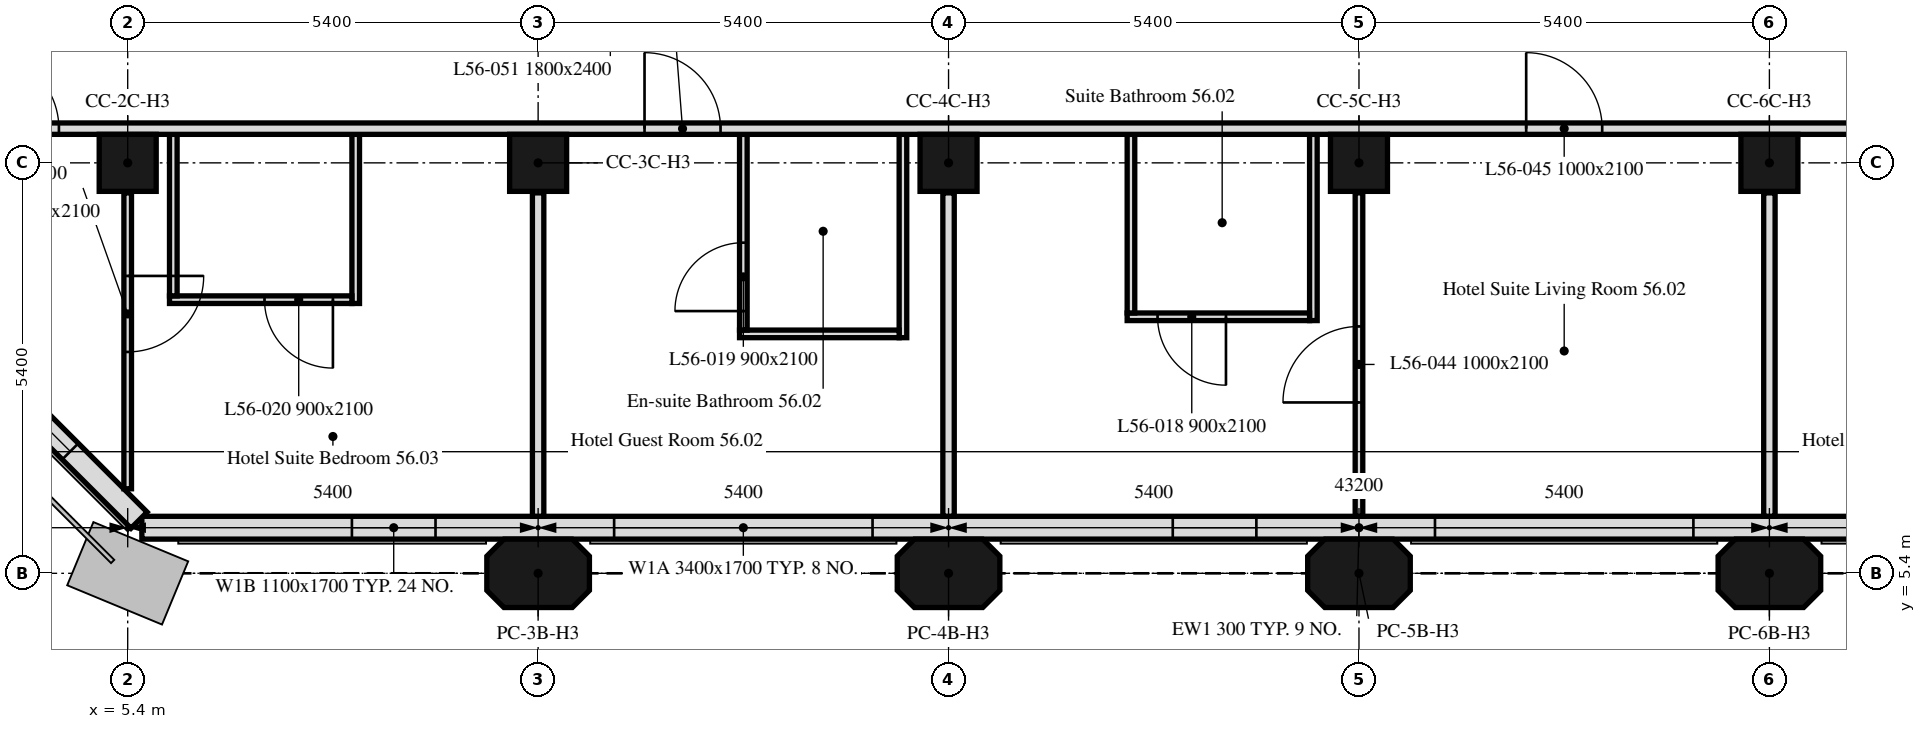
"""IFC4 building model, lengths in metres.
Left out: names, types, materials, properties, quantities, classifications, styles, units other than length and angle.
Written with IfcOpenShell. Run it as: python <this file> out.ifc"""

import sys

from ifc_helpers import new_model, si_unit, direction, frame, frame_2d, origin, origin_2d, place, context, subcontext, project, spatial, polyline, rectangle, outline, extrude, element, fill, save


model = new_model("IFC4")
c1 = context("Model", 3, precision=1e-05, world=origin(), true_north=direction((0.0, 1.0)))
c2 = subcontext(c1, "Body", "Model", "MODEL_VIEW")
j1 = project(units=[si_unit("LENGTHUNIT", "METRE"), si_unit("PLANEANGLEUNIT", "RADIAN")], contexts=[c1])
p1 = place(None, origin())
s1 = spatial("IfcSite", under=j1, at=p1, CompositionType="ELEMENT")
p2 = place(p1, origin())
s2 = spatial("IfcBuilding", under=s1, at=p2, CompositionType="ELEMENT")
p3 = place(p2, frame((0.0, 0.0, 223.6)))
s3 = spatial("IfcBuildingStorey", under=s2, at=p3, CompositionType="ELEMENT", Elevation=223.6)
for number, where, z_axis, x_axis in (
    (1, (10.8, 5.4, 0.0), (0.0, 0.0, 1.0), (1.0, 0.0, 0.0)),
    (2, (16.2, 5.4, 0.0), (0.0, 0.0, 1.0), (1.0, 0.0, 0.0)),
    (3, (21.6, 5.4, 0.0), (0.0, 0.0, 1.0), (1.0, 0.0, 0.0)),
    (4, (27.0, 5.4, 0.0), (0.0, 0.0, 1.0), (1.0, 0.0, 0.0)),
):
    element("IfcColumn", number, at=place(p3, frame(where, z_axis=z_axis, x_axis=x_axis)), inside=s3, PredefinedType="COLUMN", context=c2, shape_type="SweptSolid", body=[
        extrude(outline(polyline([(-0.45, -0.45), (0.45, -0.45), (0.675, -0.225), (0.675, 0.225), (0.45, 0.45), (-0.45, 0.45), (-0.675, 0.225), (-0.675, -0.225), (-0.45, -0.45)])), origin(), (0.0, 0.0, 1.0), 3.0),
    ])
for number, where, z_axis, x_axis in (
    (5, (5.4, 10.8, 0.0), (0.0, 0.0, 1.0), (1.0, 0.0, 0.0)),
    (6, (10.8, 10.8, 0.0), (0.0, 0.0, 1.0), (1.0, 0.0, 0.0)),
    (7, (16.2, 10.8, 0.0), (0.0, 0.0, 1.0), (1.0, 0.0, 0.0)),
    (8, (21.6, 10.8, 0.0), (0.0, 0.0, 1.0), (1.0, 0.0, 0.0)),
    (9, (27.0, 10.8, 0.0), (0.0, 0.0, 1.0), (1.0, 0.0, 0.0)),
):
    element("IfcColumn", number, at=place(p3, frame(where, z_axis=z_axis, x_axis=x_axis)), inside=s3, PredefinedType="COLUMN", context=c2, shape_type="SweptSolid", body=[
        extrude(rectangle(XDim=0.75, YDim=0.75, at=origin_2d()), origin(), (0.0, 0.0, 1.0), 3.0),
    ])
p4 = place(p3, frame((5.586, 6.0, 0.0), z_axis=(0.0, 0.0, 1.0), x_axis=(1.0, 0.0, 0.0)))
e10 = element("IfcWall", 10, at=p4, inside=s3, PredefinedType="SOLIDWALL", context=c2, shape_type="SweptSolid", body=[
    extrude(rectangle(XDim=32.027, YDim=0.3, at=frame_2d((16.014, 0.0))), origin(), (0.0, 0.0, 1.0), 3.0),
])
p5 = place(p4, frame((2.764, 0.0, 0.9)))
e11 = element("IfcOpeningElement", 11, at=p5, cuts=e10, PredefinedType="OPENING", context=c2, shape_type="SweptSolid", body=[
    extrude(rectangle(XDim=1.1, YDim=1.7, at=frame_2d((0.55, 0.85))), frame((0.0, 0.16, 0.0), z_axis=(0.0, -1.0, 0.0), x_axis=(1.0, 0.0, 0.0)), (0.0, 0.0, 1.0), 0.32),
])
p6 = place(p4, frame((6.214, 0.0, 0.9)))
e12 = element("IfcOpeningElement", 12, at=p6, cuts=e10, PredefinedType="OPENING", context=c2, shape_type="SweptSolid", body=[
    extrude(rectangle(XDim=3.4, YDim=1.7, at=frame_2d((1.7, 0.85))), frame((0.0, 0.16, 0.0), z_axis=(0.0, -1.0, 0.0), x_axis=(1.0, 0.0, 0.0)), (0.0, 0.0, 1.0), 0.32),
])
p7 = place(p4, frame((13.564, 0.0, 0.9)))
e13 = element("IfcOpeningElement", 13, at=p7, cuts=e10, PredefinedType="OPENING", context=c2, shape_type="SweptSolid", body=[
    extrude(rectangle(XDim=1.1, YDim=1.7, at=frame_2d((0.55, 0.85))), frame((0.0, 0.16, 0.0), z_axis=(0.0, -1.0, 0.0), x_axis=(1.0, 0.0, 0.0)), (0.0, 0.0, 1.0), 0.32),
])
p8 = place(p4, frame((17.014, 0.0, 0.9)))
e14 = element("IfcOpeningElement", 14, at=p8, cuts=e10, PredefinedType="OPENING", context=c2, shape_type="SweptSolid", body=[
    extrude(rectangle(XDim=3.4, YDim=1.7, at=frame_2d((1.7, 0.85))), frame((0.0, 0.16, 0.0), z_axis=(0.0, -1.0, 0.0), x_axis=(1.0, 0.0, 0.0)), (0.0, 0.0, 1.0), 0.32),
])
p9 = place(p4, frame((24.364, 0.0, 0.9)))
e15 = element("IfcOpeningElement", 15, at=p9, cuts=e10, PredefinedType="OPENING", context=c2, shape_type="SweptSolid", body=[
    extrude(rectangle(XDim=1.1, YDim=1.7, at=frame_2d((0.55, 0.85))), frame((0.0, 0.16, 0.0), z_axis=(0.0, -1.0, 0.0), x_axis=(1.0, 0.0, 0.0)), (0.0, 0.0, 1.0), 0.32),
])
p10 = place(p4, frame((27.814, 0.0, 0.9)))
e16 = element("IfcOpeningElement", 16, at=p10, cuts=e10, PredefinedType="OPENING", context=c2, shape_type="SweptSolid", body=[
    extrude(rectangle(XDim=3.4, YDim=1.7, at=frame_2d((1.7, 0.85))), frame((0.0, 0.16, 0.0), z_axis=(0.0, -1.0, 0.0), x_axis=(1.0, 0.0, 0.0)), (0.0, 0.0, 1.0), 0.32),
])
p11 = place(p3, frame((0.699, 10.949, 0.0), z_axis=(0.0, 0.0, 1.0), x_axis=(0.707106781187, -0.707106781187, 0.0)))
e17 = element("IfcWall", 17, at=p11, inside=s3, PredefinedType="SOLIDWALL", context=c2, shape_type="SweptSolid", body=[
    extrude(rectangle(XDim=6.86, YDim=0.3, at=frame_2d((3.43, 0.0))), origin(), (0.0, 0.0, 1.0), 3.0),
])
p12 = place(p11, frame((1.28, 0.0, 0.9)))
e18 = element("IfcOpeningElement", 18, at=p12, cuts=e17, PredefinedType="OPENING", context=c2, shape_type="SweptSolid", body=[
    extrude(rectangle(XDim=1.1, YDim=1.7, at=frame_2d((0.55, 0.85))), frame((0.0, 0.16, 0.0), z_axis=(0.0, -1.0, 0.0), x_axis=(1.0, 0.0, 0.0)), (0.0, 0.0, 1.0), 0.32),
])
p13 = place(p11, frame((4.48, 0.0, 0.9)))
e19 = element("IfcOpeningElement", 19, at=p13, cuts=e17, PredefinedType="OPENING", context=c2, shape_type="SweptSolid", body=[
    extrude(rectangle(XDim=1.1, YDim=1.7, at=frame_2d((0.55, 0.85))), frame((0.0, 0.16, 0.0), z_axis=(0.0, -1.0, 0.0), x_axis=(1.0, 0.0, 0.0)), (0.0, 0.0, 1.0), 0.32),
])
p14 = place(p3, frame((27.0, 10.405, 0.0), z_axis=(0.0, 0.0, 1.0), x_axis=(0.0, -1.0, 0.0)))
e20 = element("IfcWall", 20, at=p14, inside=s3, PredefinedType="PARTITIONING", context=c2, shape_type="SweptSolid", body=[
    extrude(rectangle(XDim=4.254, YDim=0.15, at=frame_2d((2.127, 0.0))), origin(), (0.0, 0.0, 1.0), 3.0),
])
p15 = place(p3, frame((21.6, 6.151, 0.0), z_axis=(0.0, 0.0, 1.0), x_axis=(0.0, 1.0, 0.0)))
e21 = element("IfcWall", 21, at=p15, inside=s3, PredefinedType="PARTITIONING", context=c2, shape_type="SweptSolid", body=[
    extrude(rectangle(XDim=4.254, YDim=0.1, at=frame_2d((2.127, 0.0))), origin(), (0.0, 0.0, 1.0), 3.0),
])
p16 = place(p15, frame((1.497, 0.0, 0.0)))
e22 = element("IfcOpeningElement", 22, at=p16, cuts=e21, PredefinedType="OPENING", context=c2, shape_type="SweptSolid", body=[
    extrude(rectangle(XDim=1.0, YDim=2.1, at=frame_2d((0.5, 1.05))), frame((0.0, 0.05, 0.0), z_axis=(0.0, -1.0, 0.0), x_axis=(1.0, 0.0, 0.0)), (0.0, 0.0, 1.0), 0.1),
])
p17 = place(p3, frame((21.0, 11.175, 0.0), z_axis=(0.0, 0.0, 1.0), x_axis=(0.0, -1.0, 0.0)))
e23 = element("IfcWall", 23, at=p17, inside=s3, PredefinedType="PARTITIONING", context=c2, shape_type="SweptSolid", body=[
    extrude(rectangle(XDim=2.45, YDim=0.1, at=frame_2d((1.225, 0.0))), origin(), (0.0, 0.0, 1.0), 3.0),
])
p18 = place(p3, frame((20.95, 8.775, 0.0), z_axis=(0.0, 0.0, 1.0), x_axis=(-1.0, 0.0, 0.0)))
e24 = element("IfcWall", 24, at=p18, inside=s3, PredefinedType="PARTITIONING", context=c2, shape_type="SweptSolid", body=[
    extrude(rectangle(XDim=2.4, YDim=0.1, at=frame_2d((1.2, 0.0))), origin(), (0.0, 0.0, 1.0), 3.0),
])
p19 = place(p18, frame((1.1, 0.0, 0.0)))
e25 = element("IfcOpeningElement", 25, at=p19, cuts=e24, PredefinedType="OPENING", context=c2, shape_type="SweptSolid", body=[
    extrude(rectangle(XDim=0.9, YDim=2.1, at=frame_2d((0.45, 1.05))), frame((0.0, 0.05, 0.0), z_axis=(0.0, -1.0, 0.0), x_axis=(1.0, 0.0, 0.0)), (0.0, 0.0, 1.0), 0.1),
])
p20 = place(p3, frame((18.6, 8.825, 0.0), z_axis=(0.0, 0.0, 1.0), x_axis=(0.0, 1.0, 0.0)))
e26 = element("IfcWall", 26, at=p20, inside=s3, PredefinedType="PARTITIONING", context=c2, shape_type="SweptSolid", body=[
    extrude(rectangle(XDim=2.35, YDim=0.1, at=frame_2d((1.175, 0.0))), origin(), (0.0, 0.0, 1.0), 3.0),
])
p21 = place(p3, frame((16.2, 10.405, 0.0), z_axis=(0.0, 0.0, 1.0), x_axis=(0.0, -1.0, 0.0)))
e27 = element("IfcWall", 27, at=p21, inside=s3, PredefinedType="PARTITIONING", context=c2, shape_type="SweptSolid", body=[
    extrude(rectangle(XDim=4.254, YDim=0.15, at=frame_2d((2.127, 0.0))), origin(), (0.0, 0.0, 1.0), 3.0),
])
p22 = place(p3, frame((15.6, 11.175, 0.0), z_axis=(0.0, 0.0, 1.0), x_axis=(0.0, -1.0, 0.0)))
e28 = element("IfcWall", 28, at=p22, inside=s3, PredefinedType="PARTITIONING", context=c2, shape_type="SweptSolid", body=[
    extrude(rectangle(XDim=2.675, YDim=0.1, at=frame_2d((1.337, 0.0))), origin(), (0.0, 0.0, 1.0), 3.0),
])
p23 = place(p3, frame((15.55, 8.55, 0.0), z_axis=(0.0, 0.0, 1.0), x_axis=(-1.0, 0.0, 0.0)))
e29 = element("IfcWall", 29, at=p23, inside=s3, PredefinedType="PARTITIONING", context=c2, shape_type="SweptSolid", body=[
    extrude(rectangle(XDim=2.1, YDim=0.1, at=frame_2d((1.05, 0.0))), origin(), (0.0, 0.0, 1.0), 3.0),
])
p24 = place(p3, frame((13.5, 8.6, 0.0), z_axis=(0.0, 0.0, 1.0), x_axis=(0.0, 1.0, 0.0)))
e30 = element("IfcWall", 30, at=p24, inside=s3, PredefinedType="PARTITIONING", context=c2, shape_type="SweptSolid", body=[
    extrude(rectangle(XDim=2.575, YDim=0.1, at=frame_2d((1.288, 0.0))), origin(), (0.0, 0.0, 1.0), 3.0),
])
p25 = place(p24, frame((0.25, 0.0, 0.0)))
e31 = element("IfcOpeningElement", 31, at=p25, cuts=e30, PredefinedType="OPENING", context=c2, shape_type="SweptSolid", body=[
    extrude(rectangle(XDim=0.9, YDim=2.1, at=frame_2d((0.45, 1.05))), frame((0.0, 0.05, 0.0), z_axis=(0.0, -1.0, 0.0), x_axis=(1.0, 0.0, 0.0)), (0.0, 0.0, 1.0), 0.1),
])
p26 = place(p3, frame((10.8, 10.405, 0.0), z_axis=(0.0, 0.0, 1.0), x_axis=(0.0, -1.0, 0.0)))
e32 = element("IfcWall", 32, at=p26, inside=s3, PredefinedType="PARTITIONING", context=c2, shape_type="SweptSolid", body=[
    extrude(rectangle(XDim=4.254, YDim=0.15, at=frame_2d((2.127, 0.0))), origin(), (0.0, 0.0, 1.0), 3.0),
])
p27 = place(p3, frame((8.4, 11.175, 0.0), z_axis=(0.0, 0.0, 1.0), x_axis=(0.0, -1.0, 0.0)))
e33 = element("IfcWall", 33, at=p27, inside=s3, PredefinedType="PARTITIONING", context=c2, shape_type="SweptSolid", body=[
    extrude(rectangle(XDim=2.225, YDim=0.1, at=frame_2d((1.113, 0.0))), origin(), (0.0, 0.0, 1.0), 3.0),
])
p28 = place(p3, frame((8.35, 9.0, 0.0), z_axis=(0.0, 0.0, 1.0), x_axis=(-1.0, 0.0, 0.0)))
e34 = element("IfcWall", 34, at=p28, inside=s3, PredefinedType="PARTITIONING", context=c2, shape_type="SweptSolid", body=[
    extrude(rectangle(XDim=2.4, YDim=0.1, at=frame_2d((1.2, 0.0))), origin(), (0.0, 0.0, 1.0), 3.0),
])
p29 = place(p28, frame((0.25, 0.0, 0.0)))
e35 = element("IfcOpeningElement", 35, at=p29, cuts=e34, PredefinedType="OPENING", context=c2, shape_type="SweptSolid", body=[
    extrude(rectangle(XDim=0.9, YDim=2.1, at=frame_2d((0.45, 1.05))), frame((0.0, 0.05, 0.0), z_axis=(0.0, -1.0, 0.0), x_axis=(1.0, 0.0, 0.0)), (0.0, 0.0, 1.0), 0.1),
])
p30 = place(p3, frame((6.0, 9.05, 0.0), z_axis=(0.0, 0.0, 1.0), x_axis=(0.0, 1.0, 0.0)))
e36 = element("IfcWall", 36, at=p30, inside=s3, PredefinedType="PARTITIONING", context=c2, shape_type="SweptSolid", body=[
    extrude(rectangle(XDim=2.125, YDim=0.1, at=frame_2d((1.062, 0.0))), origin(), (0.0, 0.0, 1.0), 3.0),
])
p31 = place(p3, frame((5.4, 10.405, 0.0), z_axis=(0.0, 0.0, 1.0), x_axis=(0.0, -1.0, 0.0)))
e37 = element("IfcWall", 37, at=p31, inside=s3, PredefinedType="PARTITIONING", context=c2, shape_type="SweptSolid", body=[
    extrude(rectangle(XDim=3.893, YDim=0.1, at=frame_2d((1.946, 0.0))), origin(), (0.0, 0.0, 1.0), 3.0),
])
p32 = place(p31, frame((1.093, 0.0, 0.0)))
e38 = element("IfcOpeningElement", 38, at=p32, cuts=e37, PredefinedType="OPENING", context=c2, shape_type="SweptSolid", body=[
    extrude(rectangle(XDim=1.0, YDim=2.1, at=frame_2d((0.5, 1.05))), frame((0.0, 0.05, 0.0), z_axis=(0.0, -1.0, 0.0), x_axis=(1.0, 0.0, 0.0)), (0.0, 0.0, 1.0), 0.1),
])
p33 = place(p3, frame((0.751, 11.25, 0.0), z_axis=(0.0, 0.0, 1.0), x_axis=(1.0, 0.0, 0.0)))
e39 = element("IfcWall", 39, at=p33, inside=s3, PredefinedType="PARTITIONING", context=c2, shape_type="SweptSolid", body=[
    extrude(rectangle(XDim=41.698, YDim=0.15, at=frame_2d((20.849, 0.0))), origin(), (0.0, 0.0, 1.0), 3.0),
])
p34 = place(p33, frame((39.249, 0.0, 0.0)))
e40 = element("IfcOpeningElement", 40, at=p34, cuts=e39, PredefinedType="OPENING", context=c2, shape_type="SweptSolid", body=[
    extrude(rectangle(XDim=1.0, YDim=2.1, at=frame_2d((0.5, 1.05))), frame((0.0, 0.075, 0.0), z_axis=(0.0, -1.0, 0.0), x_axis=(1.0, 0.0, 0.0)), (0.0, 0.0, 1.0), 0.15),
])
p35 = place(p33, frame((27.649, 0.0, 0.0)))
e41 = element("IfcOpeningElement", 41, at=p35, cuts=e39, PredefinedType="OPENING", context=c2, shape_type="SweptSolid", body=[
    extrude(rectangle(XDim=1.0, YDim=2.1, at=frame_2d((0.5, 1.05))), frame((0.0, 0.075, 0.0), z_axis=(0.0, -1.0, 0.0), x_axis=(1.0, 0.0, 0.0)), (0.0, 0.0, 1.0), 0.15),
])
p36 = place(p33, frame((23.049, 0.0, 0.0)))
e42 = element("IfcOpeningElement", 42, at=p36, cuts=e39, PredefinedType="OPENING", context=c2, shape_type="SweptSolid", body=[
    extrude(rectangle(XDim=1.0, YDim=2.1, at=frame_2d((0.5, 1.05))), frame((0.0, 0.075, 0.0), z_axis=(0.0, -1.0, 0.0), x_axis=(1.0, 0.0, 0.0)), (0.0, 0.0, 1.0), 0.15),
])
p37 = place(p33, frame((11.449, 0.0, 0.0)))
e43 = element("IfcOpeningElement", 43, at=p37, cuts=e39, PredefinedType="OPENING", context=c2, shape_type="SweptSolid", body=[
    extrude(rectangle(XDim=1.0, YDim=2.1, at=frame_2d((0.5, 1.05))), frame((0.0, 0.075, 0.0), z_axis=(0.0, -1.0, 0.0), x_axis=(1.0, 0.0, 0.0)), (0.0, 0.0, 1.0), 0.15),
])
p38 = place(p33, frame((2.744, 0.0, 0.0)))
e44 = element("IfcOpeningElement", 44, at=p38, cuts=e39, PredefinedType="OPENING", context=c2, shape_type="SweptSolid", body=[
    extrude(rectangle(XDim=1.0, YDim=2.1, at=frame_2d((0.5, 1.05))), frame((0.0, 0.075, 0.0), z_axis=(0.0, -1.0, 0.0), x_axis=(1.0, 0.0, 0.0)), (0.0, 0.0, 1.0), 0.15),
])
p39 = place(p5, origin())
e45 = element("IfcWindow", 45, at=p39, inside=s3, PartitioningType="SINGLE_PANEL", PredefinedType="WINDOW", context=c2, shape_type="SweptSolid", body=[
    extrude(rectangle(XDim=1.1, YDim=1.7, at=frame_2d((0.55, 0.85))), frame((0.0, 0.03, 0.0), z_axis=(0.0, -1.0, 0.0), x_axis=(1.0, 0.0, 0.0)), (0.0, 0.0, 1.0), 0.06),
])
fill(e11, e45)
p40 = place(p6, origin())
e46 = element("IfcWindow", 46, at=p40, inside=s3, PartitioningType="SINGLE_PANEL", PredefinedType="WINDOW", context=c2, shape_type="SweptSolid", body=[
    extrude(rectangle(XDim=3.4, YDim=1.7, at=frame_2d((1.7, 0.85))), frame((0.0, 0.03, 0.0), z_axis=(0.0, -1.0, 0.0), x_axis=(1.0, 0.0, 0.0)), (0.0, 0.0, 1.0), 0.06),
])
fill(e12, e46)
p41 = place(p7, origin())
e47 = element("IfcWindow", 47, at=p41, inside=s3, PartitioningType="SINGLE_PANEL", PredefinedType="WINDOW", context=c2, shape_type="SweptSolid", body=[
    extrude(rectangle(XDim=1.1, YDim=1.7, at=frame_2d((0.55, 0.85))), frame((0.0, 0.03, 0.0), z_axis=(0.0, -1.0, 0.0), x_axis=(1.0, 0.0, 0.0)), (0.0, 0.0, 1.0), 0.06),
])
fill(e13, e47)
p42 = place(p8, origin())
e48 = element("IfcWindow", 48, at=p42, inside=s3, PartitioningType="SINGLE_PANEL", PredefinedType="WINDOW", context=c2, shape_type="SweptSolid", body=[
    extrude(rectangle(XDim=3.4, YDim=1.7, at=frame_2d((1.7, 0.85))), frame((0.0, 0.03, 0.0), z_axis=(0.0, -1.0, 0.0), x_axis=(1.0, 0.0, 0.0)), (0.0, 0.0, 1.0), 0.06),
])
fill(e14, e48)
p43 = place(p13, origin())
e49 = element("IfcWindow", 49, at=p43, inside=s3, PartitioningType="SINGLE_PANEL", PredefinedType="WINDOW", context=c2, shape_type="SweptSolid", body=[
    extrude(rectangle(XDim=1.1, YDim=1.7, at=frame_2d((0.55, 0.85))), frame((0.0, 0.03, 0.0), z_axis=(0.0, -1.0, 0.0), x_axis=(1.0, 0.0, 0.0)), (0.0, 0.0, 1.0), 0.06),
])
fill(e19, e49)
p44 = place(p19, origin())
e50 = element("IfcDoor", 50, at=p44, inside=s3, OperationType="SINGLE_SWING_LEFT", PredefinedType="DOOR", context=c2, shape_type="SweptSolid", body=[
    extrude(rectangle(XDim=0.9, YDim=2.1, at=frame_2d((0.45, 1.05))), frame((0.0, 0.025, 0.0), z_axis=(0.0, -1.0, 0.0), x_axis=(1.0, 0.0, 0.0)), (0.0, 0.0, 1.0), 0.05),
])
fill(e25, e50)
p45 = place(p25, origin())
e51 = element("IfcDoor", 51, at=p45, inside=s3, OperationType="SINGLE_SWING_LEFT", PredefinedType="DOOR", context=c2, shape_type="SweptSolid", body=[
    extrude(rectangle(XDim=0.9, YDim=2.1, at=frame_2d((0.45, 1.05))), frame((0.0, 0.025, 0.0), z_axis=(0.0, -1.0, 0.0), x_axis=(1.0, 0.0, 0.0)), (0.0, 0.0, 1.0), 0.05),
])
fill(e31, e51)
p46 = place(p29, origin())
e52 = element("IfcDoor", 52, at=p46, inside=s3, OperationType="SINGLE_SWING_RIGHT", PredefinedType="DOOR", context=c2, shape_type="SweptSolid", body=[
    extrude(rectangle(XDim=0.9, YDim=2.1, at=frame_2d((0.45, 1.05))), frame((0.0, 0.025, 0.0), z_axis=(0.0, -1.0, 0.0), x_axis=(1.0, 0.0, 0.0)), (0.0, 0.0, 1.0), 0.05),
])
fill(e35, e52)
p47 = place(p16, origin())
e53 = element("IfcDoor", 53, at=p47, inside=s3, OperationType="SINGLE_SWING_LEFT", PredefinedType="DOOR", context=c2, shape_type="SweptSolid", body=[
    extrude(rectangle(XDim=1.0, YDim=2.1, at=frame_2d((0.5, 1.05))), frame((0.0, 0.025, 0.0), z_axis=(0.0, -1.0, 0.0), x_axis=(1.0, 0.0, 0.0)), (0.0, 0.0, 1.0), 0.05),
])
fill(e22, e53)
p48 = place(p36, origin())
e54 = element("IfcDoor", 54, at=p48, inside=s3, OperationType="SINGLE_SWING_RIGHT", PredefinedType="DOOR", context=c2, shape_type="SweptSolid", body=[
    extrude(rectangle(XDim=1.0, YDim=2.1, at=frame_2d((0.5, 1.05))), frame((0.0, 0.025, 0.0), z_axis=(0.0, -1.0, 0.0), x_axis=(1.0, 0.0, 0.0)), (0.0, 0.0, 1.0), 0.05),
])
fill(e42, e54)
p49 = place(p37, origin())
e55 = element("IfcDoor", 55, at=p49, inside=s3, OperationType="SINGLE_SWING_RIGHT", PredefinedType="DOOR", context=c2, shape_type="SweptSolid", body=[
    extrude(rectangle(XDim=1.0, YDim=2.1, at=frame_2d((0.5, 1.05))), frame((0.0, 0.025, 0.0), z_axis=(0.0, -1.0, 0.0), x_axis=(1.0, 0.0, 0.0)), (0.0, 0.0, 1.0), 0.05),
])
fill(e43, e55)
p50 = place(p32, origin())
e56 = element("IfcDoor", 56, at=p50, inside=s3, OperationType="SINGLE_SWING_RIGHT", PredefinedType="DOOR", context=c2, shape_type="SweptSolid", body=[
    extrude(rectangle(XDim=1.0, YDim=2.1, at=frame_2d((0.5, 1.05))), frame((0.0, 0.025, 0.0), z_axis=(0.0, -1.0, 0.0), x_axis=(1.0, 0.0, 0.0)), (0.0, 0.0, 1.0), 0.05),
])
fill(e38, e56)
p51 = place(p38, origin())
e57 = element("IfcDoor", 57, at=p51, inside=s3, OperationType="SINGLE_SWING_LEFT", PredefinedType="DOOR", context=c2, shape_type="SweptSolid", body=[
    extrude(rectangle(XDim=1.0, YDim=2.1, at=frame_2d((0.5, 1.05))), frame((0.0, 0.025, 0.0), z_axis=(0.0, -1.0, 0.0), x_axis=(1.0, 0.0, 0.0)), (0.0, 0.0, 1.0), 0.05),
])
fill(e44, e57)
save(model, sys.argv[1])
